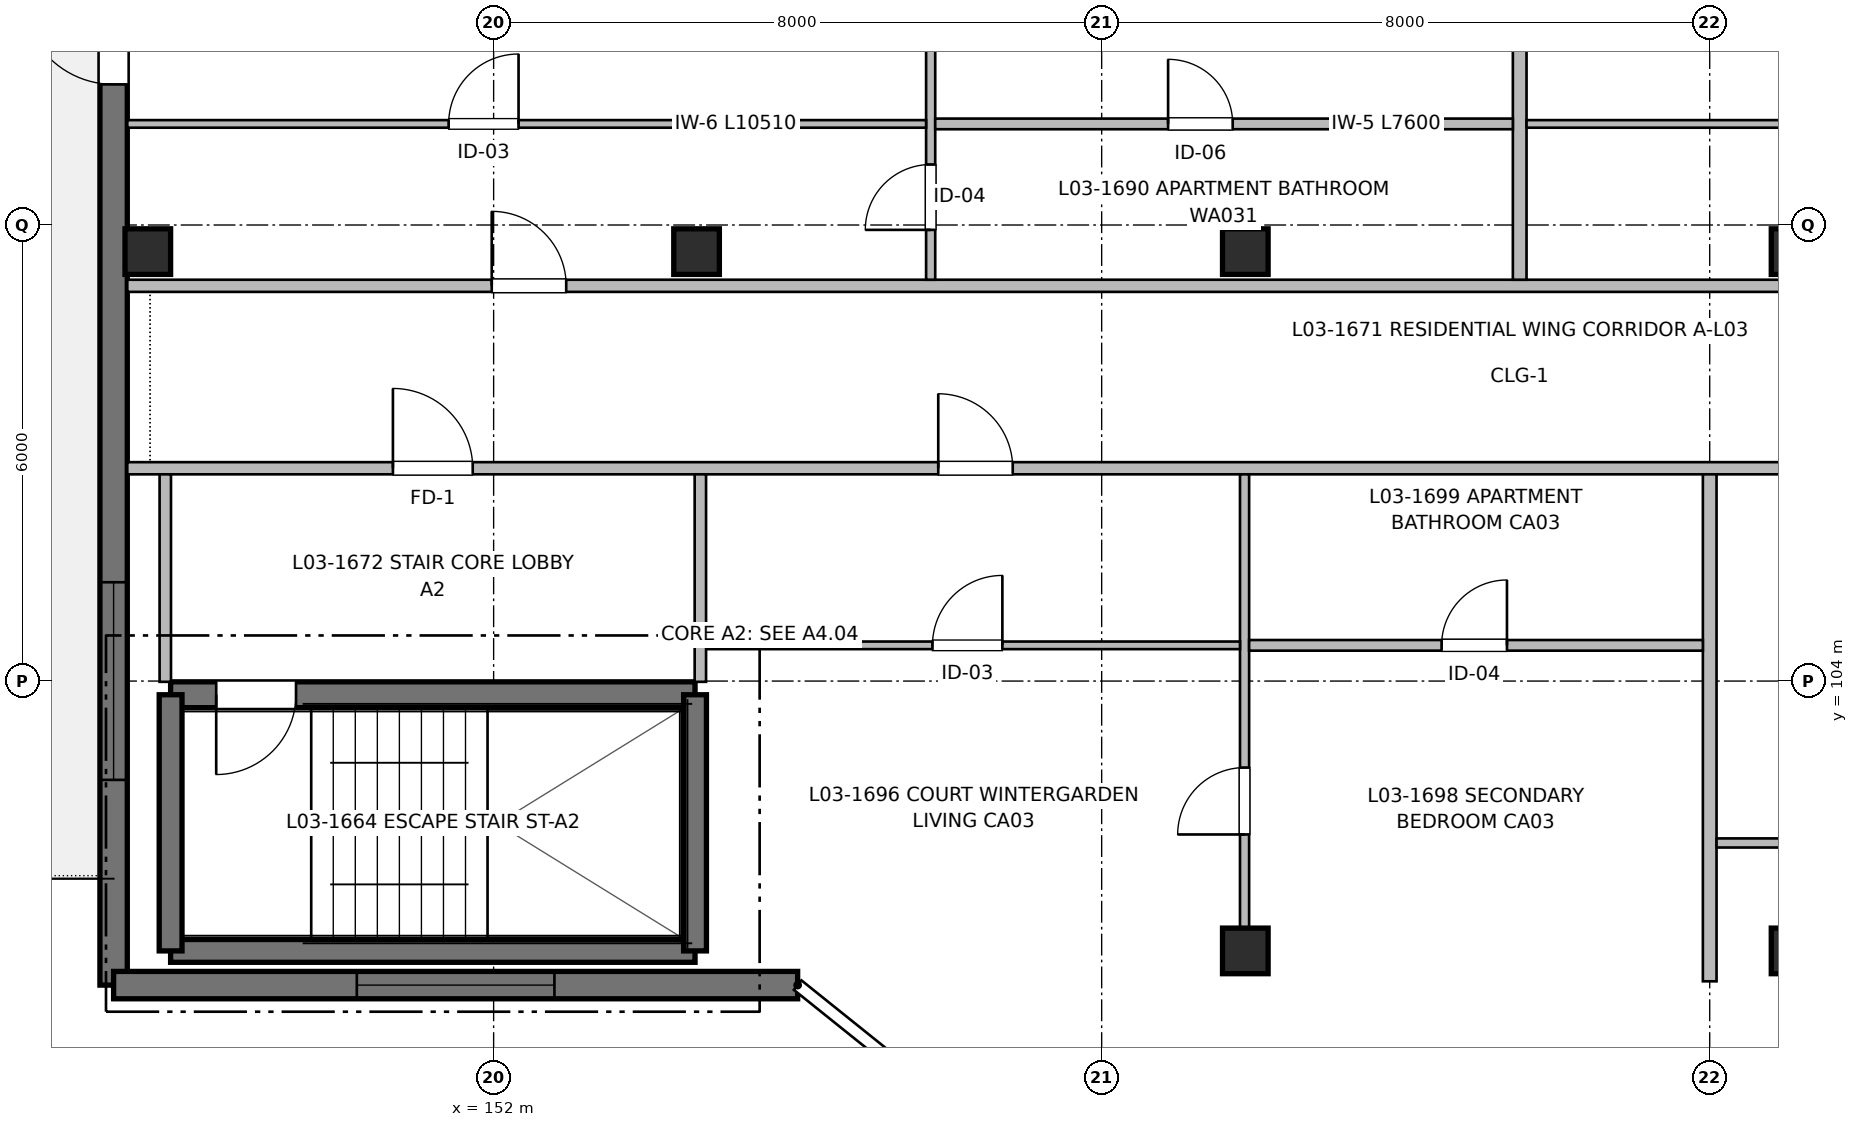
"""IFC4 building model, lengths in metres.
Left out: names, types, materials, properties, quantities, classifications, styles, units other than length and angle.
Written with IfcOpenShell. Run it as: python <this file> out.ifc"""

import sys

from ifc_helpers import new_model, si_unit, direction, frame, frame_2d, origin, origin_2d, place, context, subcontext, project, spatial, rectangle, extrude, element, fill, save


model = new_model("IFC4")
c1 = context("Model", 3, precision=1e-05, world=origin(), true_north=direction((0.0, 1.0)))
c2 = subcontext(c1, "Body", "Model", "MODEL_VIEW")
j1 = project(units=[si_unit("LENGTHUNIT", "METRE"), si_unit("PLANEANGLEUNIT", "RADIAN")], contexts=[c1])
p1 = place(None, origin())
s1 = spatial("IfcSite", under=j1, at=p1, CompositionType="ELEMENT")
p2 = place(p1, origin())
s2 = spatial("IfcBuilding", under=s1, at=p2, CompositionType="ELEMENT")
p3 = place(p2, frame((0.0, 0.0, 10.56)))
s3 = spatial("IfcBuildingStorey", under=s2, at=p3, CompositionType="ELEMENT", Elevation=10.56)
for number, where, z_axis, x_axis in (
    (1, (147.45, 109.65, 0.0), (0.0, 0.0, 1.0), (1.0, 0.0, 0.0)),
    (2, (154.67, 109.65, 0.0), (0.0, 0.0, 1.0), (1.0, 0.0, 0.0)),
    (3, (161.89, 100.45, 0.0), (0.0, 0.0, 1.0), (1.0, 0.0, 0.0)),
    (4, (161.89, 109.65, 0.0), (0.0, 0.0, 1.0), (1.0, 0.0, 0.0)),
    (5, (169.11, 100.45, 0.0), (0.0, 0.0, 1.0), (1.0, 0.0, 0.0)),
    (6, (169.11, 109.65, 0.0), (0.0, 0.0, 1.0), (1.0, 0.0, 0.0)),
):
    element("IfcColumn", number, at=place(p3, frame(where, z_axis=z_axis, x_axis=x_axis)), inside=s3, PredefinedType="COLUMN", context=c2, shape_type="SweptSolid", body=[
        extrude(rectangle(XDim=0.6, YDim=0.6, at=origin_2d()), origin(), (0.0, 0.0, 1.0), 3.2),
    ])
p4 = place(p3, frame((147.75, 100.45, 0.0), z_axis=(0.0, 0.0, 1.0), x_axis=(1.0, 0.0, 0.0)))
e7 = element("IfcWall", 7, at=p4, inside=s3, PredefinedType="SHEAR", context=c2, shape_type="SweptSolid", body=[
    extrude(rectangle(XDim=6.9, YDim=0.3, at=frame_2d((3.45, 0.0))), origin(), (0.0, 0.0, 1.0), 3.2),
])
p5 = place(p3, frame((154.65, 103.82, 0.0), z_axis=(0.0, 0.0, 1.0), x_axis=(-1.0, 0.0, 0.0)))
e8 = element("IfcWall", 8, at=p5, inside=s3, PredefinedType="SHEAR", context=c2, shape_type="SweptSolid", body=[
    extrude(rectangle(XDim=6.9, YDim=0.34, at=frame_2d((3.45, 0.0))), origin(), (0.0, 0.0, 1.0), 3.2),
])
p6 = place(p5, frame((5.25, 0.0, 0.0)))
e9 = element("IfcOpeningElement", 9, at=p6, cuts=e8, PredefinedType="OPENING", context=c2, shape_type="SweptSolid", body=[
    extrude(rectangle(XDim=1.05, YDim=2.15, at=frame_2d((0.525, 1.075))), frame((0.0, 0.18, 0.0), z_axis=(0.0, -1.0, 0.0), x_axis=(1.0, 0.0, 0.0)), (0.0, 0.0, 1.0), 0.36),
])
for number, where, z_axis, x_axis in (
    (10, (147.75, 103.82, 0.0), (0.0, 0.0, 1.0), (0.0, -1.0, 0.0)),
    (11, (154.65, 100.45, 0.0), (0.0, 0.0, 1.0), (0.0, 1.0, 0.0)),
):
    element("IfcWall", number, at=place(p3, frame(where, z_axis=z_axis, x_axis=x_axis)), inside=s3, PredefinedType="SHEAR", context=c2, shape_type="SweptSolid", body=[
        extrude(rectangle(XDim=3.37, YDim=0.3, at=frame_2d((1.685, 0.0))), origin(), (0.0, 0.0, 1.0), 3.2),
    ])
p7 = place(p3, frame((147.0, 100.0, 0.0), z_axis=(0.0, 0.0, 1.0), x_axis=(0.0, 1.0, 0.0)))
e12 = element("IfcWall", 12, at=p7, inside=s3, PredefinedType="SHEAR", context=c2, shape_type="SweptSolid", body=[
    extrude(rectangle(XDim=16.0, YDim=0.36, at=frame_2d((8.0, 0.0))), origin(), (0.0, 0.0, 1.0), 2.98),
])
p8 = place(p7, frame((2.7, 0.0, 0.67)))
e13 = element("IfcOpeningElement", 13, at=p8, cuts=e12, PredefinedType="OPENING", context=c2, shape_type="SweptSolid", body=[
    extrude(rectangle(XDim=2.6, YDim=1.55, at=frame_2d((1.3, 0.775))), frame((0.0, 0.19, 0.0), z_axis=(0.0, -1.0, 0.0), x_axis=(1.0, 0.0, 0.0)), (0.0, 0.0, 1.0), 0.38),
])
p9 = place(p7, frame((11.85, 0.0, 0.0)))
e14 = element("IfcOpeningElement", 14, at=p9, cuts=e12, PredefinedType="OPENING", context=c2, shape_type="SweptSolid", body=[
    extrude(rectangle(XDim=1.2, YDim=2.2, at=frame_2d((0.6, 1.1))), frame((0.0, 0.19, 0.0), z_axis=(0.0, -1.0, 0.0), x_axis=(1.0, 0.0, 0.0)), (0.0, 0.0, 1.0), 0.38),
])
p10 = place(p7, frame((13.3, 0.0, 0.87)))
e15 = element("IfcOpeningElement", 15, at=p10, cuts=e12, PredefinedType="OPENING", context=c2, shape_type="SweptSolid", body=[
    extrude(rectangle(XDim=1.25, YDim=1.35, at=frame_2d((0.625, 0.675))), frame((0.0, 0.19, 0.0), z_axis=(0.0, -1.0, 0.0), x_axis=(1.0, 0.0, 0.0)), (0.0, 0.0, 1.0), 0.38),
])
p11 = place(p3, frame((156.0, 100.0, 0.0), z_axis=(0.0, 0.0, 1.0), x_axis=(-1.0, 0.0, 0.0)))
e16 = element("IfcWall", 16, at=p11, inside=s3, PredefinedType="SHEAR", context=c2, shape_type="SweptSolid", body=[
    extrude(rectangle(XDim=9.0, YDim=0.36, at=frame_2d((4.5, 0.0))), origin(), (0.0, 0.0, 1.0), 2.98),
])
p12 = place(p11, frame((3.2, 0.0, 0.67)))
e17 = element("IfcOpeningElement", 17, at=p12, cuts=e16, PredefinedType="OPENING", context=c2, shape_type="SweptSolid", body=[
    extrude(rectangle(XDim=2.6, YDim=1.55, at=frame_2d((1.3, 0.775))), frame((0.0, 0.19, 0.0), z_axis=(0.0, -1.0, 0.0), x_axis=(1.0, 0.0, 0.0)), (0.0, 0.0, 1.0), 0.38),
])
p13 = place(p3, frame((147.18, 106.8, 0.0), z_axis=(0.0, 0.0, 1.0), x_axis=(1.0, 0.0, 0.0)))
e18 = element("IfcWall", 18, at=p13, inside=s3, PredefinedType="PARTITIONING", context=c2, shape_type="SweptSolid", body=[
    extrude(rectangle(XDim=27.62, YDim=0.16, at=frame_2d((13.81, 0.0))), origin(), (0.0, 0.0, 1.0), 2.935),
])
p14 = place(p13, frame((3.495, 0.0, 0.0)))
e19 = element("IfcOpeningElement", 19, at=p14, cuts=e18, PredefinedType="OPENING", context=c2, shape_type="SweptSolid", body=[
    extrude(rectangle(XDim=1.05, YDim=2.15, at=frame_2d((0.525, 1.075))), frame((0.0, 0.09, 0.0), z_axis=(0.0, -1.0, 0.0), x_axis=(1.0, 0.0, 0.0)), (0.0, 0.0, 1.0), 0.18),
])
p15 = place(p13, frame((10.67, 0.0, 0.0)))
e20 = element("IfcOpeningElement", 20, at=p15, cuts=e18, PredefinedType="OPENING", context=c2, shape_type="SweptSolid", body=[
    extrude(rectangle(XDim=0.98, YDim=2.15, at=frame_2d((0.49, 1.075))), frame((0.0, 0.09, 0.0), z_axis=(0.0, -1.0, 0.0), x_axis=(1.0, 0.0, 0.0)), (0.0, 0.0, 1.0), 0.18),
])
p16 = place(p3, frame((147.18, 109.2, 0.0), z_axis=(0.0, 0.0, 1.0), x_axis=(1.0, 0.0, 0.0)))
e21 = element("IfcWall", 21, at=p16, inside=s3, PredefinedType="PARTITIONING", context=c2, shape_type="SweptSolid", body=[
    extrude(rectangle(XDim=36.64, YDim=0.16, at=frame_2d((18.32, 0.0))), origin(), (0.0, 0.0, 1.0), 2.935),
])
p17 = place(p16, frame((4.795, 0.0, 0.0)))
e22 = element("IfcOpeningElement", 22, at=p17, cuts=e21, PredefinedType="OPENING", context=c2, shape_type="SweptSolid", body=[
    extrude(rectangle(XDim=0.98, YDim=2.15, at=frame_2d((0.49, 1.075))), frame((0.0, 0.09, 0.0), z_axis=(0.0, -1.0, 0.0), x_axis=(1.0, 0.0, 0.0)), (0.0, 0.0, 1.0), 0.18),
])
p18 = place(p16, frame((23.205, 0.0, 0.0)))
e23 = element("IfcOpeningElement", 23, at=p18, cuts=e21, PredefinedType="OPENING", context=c2, shape_type="SweptSolid", body=[
    extrude(rectangle(XDim=0.98, YDim=2.15, at=frame_2d((0.49, 1.075))), frame((0.0, 0.09, 0.0), z_axis=(0.0, -1.0, 0.0), x_axis=(1.0, 0.0, 0.0)), (0.0, 0.0, 1.0), 0.18),
])
p19 = place(p3, frame((168.0, 100.05, 0.0), z_axis=(0.0, 0.0, 1.0), x_axis=(0.0, 1.0, 0.0)))
e24 = element("IfcWall", 24, at=p19, inside=s3, PredefinedType="PARTITIONING", context=c2, shape_type="SweptSolid", body=[
    extrude(rectangle(XDim=6.67, YDim=0.18, at=frame_2d((3.335, 0.0))), origin(), (0.0, 0.0, 1.0), 2.935),
])
for number, where, z_axis, x_axis in (
    (25, (147.68, 103.99, 0.0), (0.0, 0.0, 1.0), (0.0, 1.0, 0.0)),
    (26, (154.72, 103.99, 0.0), (0.0, 0.0, 1.0), (0.0, 1.0, 0.0)),
):
    element("IfcWall", number, at=place(p3, frame(where, z_axis=z_axis, x_axis=x_axis)), inside=s3, PredefinedType="PARTITIONING", context=c2, shape_type="SweptSolid", body=[
        extrude(rectangle(XDim=2.73, YDim=0.15, at=frame_2d((1.365, 0.0))), origin(), (0.0, 0.0, 1.0), 2.935),
    ])
p20 = place(p3, frame((168.09, 101.87, 0.0), z_axis=(0.0, 0.0, 1.0), x_axis=(1.0, 0.0, 0.0)))
e27 = element("IfcWall", 27, at=p20, inside=s3, PredefinedType="PARTITIONING", context=c2, shape_type="SweptSolid", body=[
    extrude(rectangle(XDim=4.19, YDim=0.12, at=frame_2d((2.095, 0.0))), origin(), (0.0, 0.0, 1.0), 2.935),
])
p21 = place(p20, frame((2.045, 0.0, 0.0)))
e28 = element("IfcOpeningElement", 28, at=p21, cuts=e27, PredefinedType="OPENING", context=c2, shape_type="SweptSolid", body=[
    extrude(rectangle(XDim=0.9, YDim=2.1, at=frame_2d((0.45, 1.05))), frame((0.0, 0.07, 0.0), z_axis=(0.0, -1.0, 0.0), x_axis=(1.0, 0.0, 0.0)), (0.0, 0.0, 1.0), 0.14),
])
p22 = place(p3, frame((165.5, 109.28, 0.0), z_axis=(0.0, 0.0, 1.0), x_axis=(0.0, 1.0, 0.0)))
e29 = element("IfcWall", 29, at=p22, inside=s3, PredefinedType="PARTITIONING", context=c2, shape_type="SweptSolid", body=[
    extrude(rectangle(XDim=6.59, YDim=0.18, at=frame_2d((3.295, 0.0))), origin(), (0.0, 0.0, 1.0), 2.935),
])
p23 = place(p3, frame((157.75, 109.28, 0.0), z_axis=(0.0, 0.0, 1.0), x_axis=(0.0, 1.0, 0.0)))
e30 = element("IfcWall", 30, at=p23, inside=s3, PredefinedType="PARTITIONING", context=c2, shape_type="SweptSolid", body=[
    extrude(rectangle(XDim=6.59, YDim=0.12, at=frame_2d((3.295, 0.0))), origin(), (0.0, 0.0, 1.0), 2.935),
])
p24 = place(p23, frame((0.656, 0.0, 0.0)))
e31 = element("IfcOpeningElement", 31, at=p24, cuts=e30, PredefinedType="OPENING", context=c2, shape_type="SweptSolid", body=[
    extrude(rectangle(XDim=0.86, YDim=2.1, at=frame_2d((0.43, 1.05))), frame((0.0, 0.07, 0.0), z_axis=(0.0, -1.0, 0.0), x_axis=(1.0, 0.0, 0.0)), (0.0, 0.0, 1.0), 0.14),
])
p25 = place(p23, frame((4.093, 0.0, 0.0)))
e32 = element("IfcOpeningElement", 32, at=p25, cuts=e30, PredefinedType="OPENING", context=c2, shape_type="SweptSolid", body=[
    extrude(rectangle(XDim=0.9, YDim=2.1, at=frame_2d((0.45, 1.05))), frame((0.0, 0.07, 0.0), z_axis=(0.0, -1.0, 0.0), x_axis=(1.0, 0.0, 0.0)), (0.0, 0.0, 1.0), 0.14),
])
p26 = place(p3, frame((157.81, 111.33, 0.0), z_axis=(0.0, 0.0, 1.0), x_axis=(1.0, 0.0, 0.0)))
e33 = element("IfcWall", 33, at=p26, inside=s3, PredefinedType="PARTITIONING", context=c2, shape_type="SweptSolid", body=[
    extrude(rectangle(XDim=7.6, YDim=0.14, at=frame_2d((3.8, 0.0))), origin(), (0.0, 0.0, 1.0), 2.935),
])
p27 = place(p26, frame((3.064, 0.0, 0.0)))
e34 = element("IfcOpeningElement", 34, at=p27, cuts=e33, PredefinedType="OPENING", context=c2, shape_type="SweptSolid", body=[
    extrude(rectangle(XDim=0.85, YDim=2.05, at=frame_2d((0.425, 1.025))), frame((0.0, 0.08, 0.0), z_axis=(0.0, -1.0, 0.0), x_axis=(1.0, 0.0, 0.0)), (0.0, 0.0, 1.0), 0.16),
])
p28 = place(p3, frame((147.18, 111.33, 0.0), z_axis=(0.0, 0.0, 1.0), x_axis=(1.0, 0.0, 0.0)))
e35 = element("IfcWall", 35, at=p28, inside=s3, PredefinedType="PARTITIONING", context=c2, shape_type="SweptSolid", body=[
    extrude(rectangle(XDim=10.51, YDim=0.1, at=frame_2d((5.255, 0.0))), origin(), (0.0, 0.0, 1.0), 2.935),
])
p29 = place(p28, frame((4.228, 0.0, 0.0)))
e36 = element("IfcOpeningElement", 36, at=p29, cuts=e35, PredefinedType="OPENING", context=c2, shape_type="SweptSolid", body=[
    extrude(rectangle(XDim=0.92, YDim=2.1, at=frame_2d((0.46, 1.05))), frame((0.0, 0.06, 0.0), z_axis=(0.0, -1.0, 0.0), x_axis=(1.0, 0.0, 0.0)), (0.0, 0.0, 1.0), 0.12),
])
p30 = place(p3, frame((165.59, 111.33, 0.0), z_axis=(0.0, 0.0, 1.0), x_axis=(1.0, 0.0, 0.0)))
e37 = element("IfcWall", 37, at=p30, inside=s3, PredefinedType="PARTITIONING", context=c2, shape_type="SweptSolid", body=[
    extrude(rectangle(XDim=10.51, YDim=0.1, at=frame_2d((5.255, 0.0))), origin(), (0.0, 0.0, 1.0), 2.935),
])
p31 = place(p30, frame((4.228, 0.0, 0.0)))
e38 = element("IfcOpeningElement", 38, at=p31, cuts=e37, PredefinedType="OPENING", context=c2, shape_type="SweptSolid", body=[
    extrude(rectangle(XDim=0.92, YDim=2.1, at=frame_2d((0.46, 1.05))), frame((0.0, 0.06, 0.0), z_axis=(0.0, -1.0, 0.0), x_axis=(1.0, 0.0, 0.0)), (0.0, 0.0, 1.0), 0.12),
])
p32 = place(p3, frame((161.88, 100.18, 0.0), z_axis=(0.0, 0.0, 1.0), x_axis=(0.0, 1.0, 0.0)))
e39 = element("IfcWall", 39, at=p32, inside=s3, PredefinedType="PARTITIONING", context=c2, shape_type="SweptSolid", body=[
    extrude(rectangle(XDim=6.54, YDim=0.12, at=frame_2d((3.27, 0.0))), origin(), (0.0, 0.0, 1.0), 2.68),
])
p33 = place(p32, frame((1.802, 0.0, 0.0)))
e40 = element("IfcOpeningElement", 40, at=p33, cuts=e39, PredefinedType="OPENING", context=c2, shape_type="SweptSolid", body=[
    extrude(rectangle(XDim=0.88, YDim=2.1, at=frame_2d((0.44, 1.05))), frame((0.0, 0.07, 0.0), z_axis=(0.0, -1.0, 0.0), x_axis=(1.0, 0.0, 0.0)), (0.0, 0.0, 1.0), 0.14),
])
p34 = place(p3, frame((161.94, 104.47, 0.0), z_axis=(0.0, 0.0, 1.0), x_axis=(1.0, 0.0, 0.0)))
e41 = element("IfcWall", 41, at=p34, inside=s3, PredefinedType="PARTITIONING", context=c2, shape_type="SweptSolid", body=[
    extrude(rectangle(XDim=5.97, YDim=0.14, at=frame_2d((2.985, 0.0))), origin(), (0.0, 0.0, 1.0), 2.935),
])
p35 = place(p34, frame((2.533, 0.0, 0.0)))
e42 = element("IfcOpeningElement", 42, at=p35, cuts=e41, PredefinedType="OPENING", context=c2, shape_type="SweptSolid", body=[
    extrude(rectangle(XDim=0.86, YDim=2.1, at=frame_2d((0.43, 1.05))), frame((0.0, 0.08, 0.0), z_axis=(0.0, -1.0, 0.0), x_axis=(1.0, 0.0, 0.0)), (0.0, 0.0, 1.0), 0.16),
])
p36 = place(p3, frame((154.8, 104.47, 0.0), z_axis=(0.0, 0.0, 1.0), x_axis=(1.0, 0.0, 0.0)))
e43 = element("IfcWall", 43, at=p36, inside=s3, PredefinedType="PARTITIONING", context=c2, shape_type="SweptSolid", body=[
    extrude(rectangle(XDim=7.02, YDim=0.1, at=frame_2d((3.51, 0.0))), origin(), (0.0, 0.0, 1.0), 2.935),
])
p37 = place(p36, frame((2.974, 0.0, 0.0)))
e44 = element("IfcOpeningElement", 44, at=p37, cuts=e43, PredefinedType="OPENING", context=c2, shape_type="SweptSolid", body=[
    extrude(rectangle(XDim=0.92, YDim=2.1, at=frame_2d((0.46, 1.05))), frame((0.0, 0.06, 0.0), z_axis=(0.0, -1.0, 0.0), x_axis=(1.0, 0.0, 0.0)), (0.0, 0.0, 1.0), 0.12),
])
p38 = place(p6, origin())
e45 = element("IfcDoor", 45, at=p38, inside=s3, OperationType="SINGLE_SWING_RIGHT", PredefinedType="DOOR", context=c2, shape_type="SweptSolid", body=[
    extrude(rectangle(XDim=1.05, YDim=2.15, at=frame_2d((0.525, 1.075))), frame((0.0, 0.025, 0.0), z_axis=(0.0, -1.0, 0.0), x_axis=(1.0, 0.0, 0.0)), (0.0, 0.0, 1.0), 0.05),
])
fill(e9, e45)
p39 = place(p8, origin())
e46 = element("IfcWindow", 46, at=p39, inside=s3, PartitioningType="SINGLE_PANEL", PredefinedType="WINDOW", context=c2, shape_type="SweptSolid", body=[
    extrude(rectangle(XDim=2.6, YDim=1.55, at=frame_2d((1.3, 0.775))), frame((0.0, 0.03, 0.0), z_axis=(0.0, -1.0, 0.0), x_axis=(1.0, 0.0, 0.0)), (0.0, 0.0, 1.0), 0.06),
])
fill(e13, e46)
p40 = place(p9, origin())
e47 = element("IfcDoor", 47, at=p40, inside=s3, OperationType="SINGLE_SWING_RIGHT", PredefinedType="DOOR", context=c2, shape_type="SweptSolid", body=[
    extrude(rectangle(XDim=1.2, YDim=2.2, at=frame_2d((0.6, 1.1))), frame((0.0, 0.025, 0.0), z_axis=(0.0, -1.0, 0.0), x_axis=(1.0, 0.0, 0.0)), (0.0, 0.0, 1.0), 0.05),
])
fill(e14, e47)
p41 = place(p12, origin())
e48 = element("IfcWindow", 48, at=p41, inside=s3, PartitioningType="SINGLE_PANEL", PredefinedType="WINDOW", context=c2, shape_type="SweptSolid", body=[
    extrude(rectangle(XDim=2.6, YDim=1.55, at=frame_2d((1.3, 0.775))), frame((0.0, 0.03, 0.0), z_axis=(0.0, -1.0, 0.0), x_axis=(1.0, 0.0, 0.0)), (0.0, 0.0, 1.0), 0.06),
])
fill(e17, e48)
p42 = place(p14, origin())
e49 = element("IfcDoor", 49, at=p42, inside=s3, OperationType="SINGLE_SWING_LEFT", PredefinedType="DOOR", context=c2, shape_type="SweptSolid", body=[
    extrude(rectangle(XDim=1.05, YDim=2.15, at=frame_2d((0.525, 1.075))), frame((0.0, 0.025, 0.0), z_axis=(0.0, -1.0, 0.0), x_axis=(1.0, 0.0, 0.0)), (0.0, 0.0, 1.0), 0.05),
])
fill(e19, e49)
p43 = place(p17, origin())
e50 = element("IfcDoor", 50, at=p43, inside=s3, OperationType="SINGLE_SWING_LEFT", PredefinedType="DOOR", context=c2, shape_type="SweptSolid", body=[
    extrude(rectangle(XDim=0.98, YDim=2.15, at=frame_2d((0.49, 1.075))), frame((0.0, 0.025, 0.0), z_axis=(0.0, -1.0, 0.0), x_axis=(1.0, 0.0, 0.0)), (0.0, 0.0, 1.0), 0.05),
])
fill(e22, e50)
p44 = place(p29, origin())
e51 = element("IfcDoor", 51, at=p44, inside=s3, OperationType="SINGLE_SWING_RIGHT", PredefinedType="DOOR", context=c2, shape_type="SweptSolid", body=[
    extrude(rectangle(XDim=0.92, YDim=2.1, at=frame_2d((0.46, 1.05))), frame((0.0, 0.025, 0.0), z_axis=(0.0, -1.0, 0.0), x_axis=(1.0, 0.0, 0.0)), (0.0, 0.0, 1.0), 0.05),
])
fill(e36, e51)
p45 = place(p24, origin())
e52 = element("IfcDoor", 52, at=p45, inside=s3, OperationType="SINGLE_SWING_LEFT", PredefinedType="DOOR", context=c2, shape_type="SweptSolid", body=[
    extrude(rectangle(XDim=0.86, YDim=2.1, at=frame_2d((0.43, 1.05))), frame((0.0, 0.025, 0.0), z_axis=(0.0, -1.0, 0.0), x_axis=(1.0, 0.0, 0.0)), (0.0, 0.0, 1.0), 0.05),
])
fill(e31, e52)
p46 = place(p27, origin())
e53 = element("IfcDoor", 53, at=p46, inside=s3, OperationType="SINGLE_SWING_LEFT", PredefinedType="DOOR", context=c2, shape_type="SweptSolid", body=[
    extrude(rectangle(XDim=0.85, YDim=2.05, at=frame_2d((0.425, 1.025))), frame((0.0, 0.025, 0.0), z_axis=(0.0, -1.0, 0.0), x_axis=(1.0, 0.0, 0.0)), (0.0, 0.0, 1.0), 0.05),
])
fill(e34, e53)
p47 = place(p15, origin())
e54 = element("IfcDoor", 54, at=p47, inside=s3, OperationType="SINGLE_SWING_LEFT", PredefinedType="DOOR", context=c2, shape_type="SweptSolid", body=[
    extrude(rectangle(XDim=0.98, YDim=2.15, at=frame_2d((0.49, 1.075))), frame((0.0, 0.025, 0.0), z_axis=(0.0, -1.0, 0.0), x_axis=(1.0, 0.0, 0.0)), (0.0, 0.0, 1.0), 0.05),
])
fill(e20, e54)
p48 = place(p37, origin())
e55 = element("IfcDoor", 55, at=p48, inside=s3, OperationType="SINGLE_SWING_RIGHT", PredefinedType="DOOR", context=c2, shape_type="SweptSolid", body=[
    extrude(rectangle(XDim=0.92, YDim=2.1, at=frame_2d((0.46, 1.05))), frame((0.0, 0.025, 0.0), z_axis=(0.0, -1.0, 0.0), x_axis=(1.0, 0.0, 0.0)), (0.0, 0.0, 1.0), 0.05),
])
fill(e44, e55)
p49 = place(p33, origin())
e56 = element("IfcDoor", 56, at=p49, inside=s3, OperationType="SINGLE_SWING_LEFT", PredefinedType="DOOR", context=c2, shape_type="SweptSolid", body=[
    extrude(rectangle(XDim=0.88, YDim=2.1, at=frame_2d((0.44, 1.05))), frame((0.0, 0.025, 0.0), z_axis=(0.0, -1.0, 0.0), x_axis=(1.0, 0.0, 0.0)), (0.0, 0.0, 1.0), 0.05),
])
fill(e40, e56)
p50 = place(p35, origin())
e57 = element("IfcDoor", 57, at=p50, inside=s3, OperationType="SINGLE_SWING_RIGHT", PredefinedType="DOOR", context=c2, shape_type="SweptSolid", body=[
    extrude(rectangle(XDim=0.86, YDim=2.1, at=frame_2d((0.43, 1.05))), frame((0.0, 0.025, 0.0), z_axis=(0.0, -1.0, 0.0), x_axis=(1.0, 0.0, 0.0)), (0.0, 0.0, 1.0), 0.05),
])
fill(e42, e57)
save(model, sys.argv[1])
